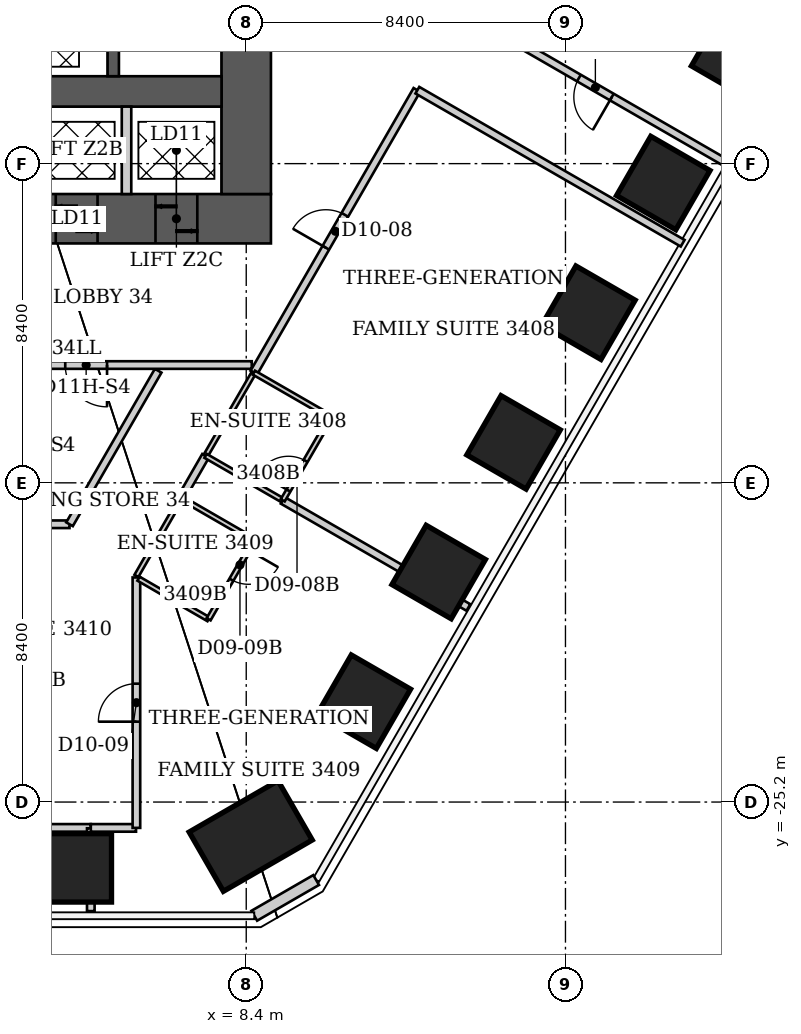
"""IFC4 building model, lengths in metres.
Left out: names, types, materials, properties, quantities, classifications, styles, units other than length and angle.
Written with IfcOpenShell. Run it as: python <this file> out.ifc"""

import sys

from ifc_helpers import new_model, si_unit, direction, frame, frame_2d, origin, origin_2d, place, context, subcontext, project, spatial, rectangle, extrude, element, fill, save


model = new_model("IFC4")
c1 = context("Model", 3, precision=1e-05, world=origin(), true_north=direction((0.0, 1.0)))
c2 = subcontext(c1, "Body", "Model", "MODEL_VIEW")
j1 = project(units=[si_unit("LENGTHUNIT", "METRE"), si_unit("PLANEANGLEUNIT", "RADIAN")], contexts=[c1])
p1 = place(None, origin())
s1 = spatial("IfcSite", under=j1, at=p1, CompositionType="ELEMENT")
p2 = place(p1, origin())
s2 = spatial("IfcBuilding", under=s1, at=p2, CompositionType="ELEMENT")
p3 = place(p2, frame((0.0, 0.0, 138.6)))
s3 = spatial("IfcBuildingStorey", under=s2, at=p3, CompositionType="ELEMENT", Elevation=138.6)
for number, where, z_axis, x_axis in (
    (1, (21.344, -5.499, 0.0), (0.0, 0.0, 1.0), (0.866, -0.5, 0.0)),
    (2, (19.374, -8.911, 0.0), (0.0, 0.0, 1.0), (0.866, -0.5, 0.0)),
    (3, (17.404, -12.323, 0.0), (0.0, 0.0, 1.0), (0.866, -0.5, 0.0)),
    (4, (15.434, -15.735, 0.0), (0.0, 0.0, 1.0), (0.866, -0.5, 0.0)),
    (5, (13.464, -19.147, 0.0), (0.0, 0.0, 1.0), (0.866, -0.5, 0.0)),
    (6, (11.494, -22.559, 0.0), (0.0, 0.0, 1.0), (0.866, -0.5, 0.0)),
):
    element("IfcColumn", number, at=place(p3, frame(where, z_axis=z_axis, x_axis=x_axis)), inside=s3, PredefinedType="COLUMN", context=c2, shape_type="SweptSolid", body=[
        extrude(rectangle(XDim=1.8, YDim=1.8, at=origin_2d()), origin(), (0.0, 0.0, 1.0), 3.8),
    ])
p4 = place(p3, frame((8.518, -26.094, 0.0), z_axis=(0.0, 0.0, 1.0), x_axis=(0.5, -0.866025403784, 0.0)))
e7 = element("IfcColumn", 7, at=p4, inside=s3, PredefinedType="COLUMN", context=c2, shape_type="SweptSolid", body=[
    extrude(rectangle(XDim=1.8, YDim=2.7, at=origin_2d()), origin(), (0.0, 0.0, 1.0), 3.8),
])
p5 = place(p3, frame((3.955, -26.932, 0.0), z_axis=(0.0, 0.0, 1.0), x_axis=(0.0, -1.0, 0.0)))
e8 = element("IfcColumn", 8, at=p5, inside=s3, PredefinedType="COLUMN", context=c2, shape_type="SweptSolid", body=[
    extrude(rectangle(XDim=1.8, YDim=1.8, at=origin_2d()), origin(), (0.0, 0.0, 1.0), 3.8),
])
p6 = place(p3, frame((-9.05, -9.85, 0.0), z_axis=(0.0, 0.0, 1.0), x_axis=(1.0, 0.0, 0.0)))
e9 = element("IfcWall", 9, at=p6, inside=s3, PredefinedType="SHEAR", context=c2, shape_type="SweptSolid", body=[
    extrude(rectangle(XDim=18.1, YDim=1.3, at=frame_2d((9.05, 0.0))), origin(), (0.0, 0.0, 1.0), 3.8),
])
p7 = place(p6, frame((1.938, 0.0, 0.0)))
e10 = element("IfcOpeningElement", 10, at=p7, cuts=e9, PredefinedType="OPENING", context=c2, shape_type="SweptSolid", body=[
    extrude(rectangle(XDim=1.1, YDim=2.2, at=frame_2d((0.55, 1.1))), frame((0.0, 0.65, 0.0), z_axis=(0.0, -1.0, 0.0), x_axis=(1.0, 0.0, 0.0)), (0.0, 0.0, 1.0), 1.3),
])
p8 = place(p6, frame((9.812, 0.0, 0.0)))
e11 = element("IfcOpeningElement", 11, at=p8, cuts=e9, PredefinedType="OPENING", context=c2, shape_type="SweptSolid", body=[
    extrude(rectangle(XDim=1.1, YDim=2.1, at=frame_2d((0.55, 1.05))), frame((0.0, 0.65, 0.0), z_axis=(0.0, -1.0, 0.0), x_axis=(1.0, 0.0, 0.0)), (0.0, 0.0, 1.0), 1.3),
])
p9 = place(p6, frame((12.438, 0.0, 0.0)))
e12 = element("IfcOpeningElement", 12, at=p9, cuts=e9, PredefinedType="OPENING", context=c2, shape_type="SweptSolid", body=[
    extrude(rectangle(XDim=1.1, YDim=2.1, at=frame_2d((0.55, 1.05))), frame((0.0, 0.65, 0.0), z_axis=(0.0, -1.0, 0.0), x_axis=(1.0, 0.0, 0.0)), (0.0, 0.0, 1.0), 1.3),
])
p10 = place(p6, frame((15.062, 0.0, 0.0)))
e13 = element("IfcOpeningElement", 13, at=p10, cuts=e9, PredefinedType="OPENING", context=c2, shape_type="SweptSolid", body=[
    extrude(rectangle(XDim=1.1, YDim=2.1, at=frame_2d((0.55, 1.05))), frame((0.0, 0.65, 0.0), z_axis=(0.0, -1.0, 0.0), x_axis=(1.0, 0.0, 0.0)), (0.0, 0.0, 1.0), 1.3),
])
p11 = place(p3, frame((8.4, -9.2, 0.0), z_axis=(0.0, 0.0, 1.0), x_axis=(0.0, 1.0, 0.0)))
e14 = element("IfcWall", 14, at=p11, inside=s3, PredefinedType="SHEAR", context=c2, shape_type="SweptSolid", body=[
    extrude(rectangle(XDim=15.3, YDim=1.3, at=frame_2d((7.65, 0.0))), origin(), (0.0, 0.0, 1.0), 3.8),
])
p12 = place(p11, frame((10.7, 0.0, 0.0)))
e15 = element("IfcOpeningElement", 15, at=p12, cuts=e14, PredefinedType="OPENING", context=c2, shape_type="SweptSolid", body=[
    extrude(rectangle(XDim=1.2, YDim=2.2, at=frame_2d((0.6, 1.1))), frame((0.0, 0.65, 0.0), z_axis=(0.0, -1.0, 0.0), x_axis=(1.0, 0.0, 0.0)), (0.0, 0.0, 1.0), 1.3),
])
p13 = place(p3, frame((-7.75, -6.5, 0.0), z_axis=(0.0, 0.0, 1.0), x_axis=(1.0, 0.0, 0.0)))
e16 = element("IfcWall", 16, at=p13, inside=s3, PredefinedType="SHEAR", context=c2, shape_type="SweptSolid", body=[
    extrude(rectangle(XDim=15.5, YDim=0.8, at=frame_2d((7.75, 0.0))), origin(), (0.0, 0.0, 1.0), 3.8),
])
p14 = place(p3, frame((4.9, -6.1, 0.0), z_axis=(0.0, 0.0, 1.0), x_axis=(0.0, 1.0, 0.0)))
e17 = element("IfcWall", 17, at=p14, inside=s3, PredefinedType="SHEAR", context=c2, shape_type="SweptSolid", body=[
    extrude(rectangle(XDim=7.2, YDim=0.3, at=frame_2d((3.6, 0.0))), origin(), (0.0, 0.0, 1.0), 3.8),
])
p15 = place(p3, frame((5.25, -9.2, 0.0), z_axis=(0.0, 0.0, 1.0), x_axis=(0.0, 1.0, 0.0)))
e18 = element("IfcWall", 18, at=p15, inside=s3, PredefinedType="PARTITIONING", context=c2, shape_type="SweptSolid", body=[
    extrude(rectangle(XDim=2.3, YDim=0.25, at=frame_2d((1.15, 0.0))), origin(), (0.0, 0.0, 1.0), 3.8),
])
p16 = place(p3, frame((10.24, -27.252, 0.0), z_axis=(0.0, 0.0, 1.0), x_axis=(-0.866045024864, -0.499966013754, 0.0)))
e19 = element("IfcWall", 19, at=p16, inside=s3, PredefinedType="SOLIDWALL", context=c2, shape_type="SweptSolid", body=[
    extrude(rectangle(XDim=1.88, YDim=0.3, at=frame_2d((0.94, 0.0))), origin(), (0.0, 0.0, 1.0), 3.64),
])
p17 = place(p3, frame((3.125, -25.88, 0.0), z_axis=(0.0, 0.0, 1.0), x_axis=(1.0, 0.0, 0.0)))
e20 = element("IfcWall", 20, at=p17, inside=s3, PredefinedType="PARTITIONING", context=c2, shape_type="SweptSolid", body=[
    extrude(rectangle(XDim=1.185, YDim=0.2, at=frame_2d((0.593, 0.0))), origin(), (0.0, 0.0, 1.0), 3.64),
])
p18 = place(p3, frame((3.75, -17.89, 0.0), z_axis=(0.0, 0.0, 1.0), x_axis=(-1.0, 0.0, 0.0)))
e21 = element("IfcWall", 21, at=p18, inside=s3, PredefinedType="PARTITIONING", context=c2, shape_type="SweptSolid", body=[
    extrude(rectangle(XDim=2.15, YDim=0.2, at=frame_2d((1.075, 0.0))), origin(), (0.0, 0.0, 1.0), 3.64),
])
p19 = place(p3, frame((4.31, -28.07, 0.0), z_axis=(0.0, 0.0, 1.0), x_axis=(0.0, 1.0, 0.0)))
e22 = element("IfcWall", 22, at=p19, inside=s3, PredefinedType="PARTITIONING", context=c2, shape_type="SweptSolid", body=[
    extrude(rectangle(XDim=2.18, YDim=0.2, at=frame_2d((1.09, 0.0))), origin(), (0.0, 0.0, 1.0), 3.64),
])
p20 = place(p3, frame((4.31, -25.88, 0.0), z_axis=(0.0, 0.0, 1.0), x_axis=(1.0, 0.0, 0.0)))
e23 = element("IfcWall", 23, at=p20, inside=s3, PredefinedType="PARTITIONING", context=c2, shape_type="SweptSolid", body=[
    extrude(rectangle(XDim=1.19, YDim=0.2, at=frame_2d((0.595, 0.0))), origin(), (0.0, 0.0, 1.0), 3.64),
])
p21 = place(p3, frame((5.51, -25.88, 0.0), z_axis=(0.0, 0.0, 1.0), x_axis=(0.0, 1.0, 0.0)))
e24 = element("IfcWall", 24, at=p21, inside=s3, PredefinedType="PARTITIONING", context=c2, shape_type="SweptSolid", body=[
    extrude(rectangle(XDim=6.59, YDim=0.2, at=frame_2d((3.295, 0.0))), origin(), (0.0, 0.0, 1.0), 3.64),
])
p22 = place(p21, frame((2.795, 0.0, 0.0)))
e25 = element("IfcOpeningElement", 25, at=p22, cuts=e24, PredefinedType="OPENING", context=c2, shape_type="SweptSolid", body=[
    extrude(rectangle(XDim=1.0, YDim=2.13, at=frame_2d((0.5, 1.065))), frame((0.0, 0.1, 0.0), z_axis=(0.0, -1.0, 0.0), x_axis=(1.0, 0.0, 0.0)), (0.0, 0.0, 1.0), 0.2),
])
p23 = place(p3, frame((5.51, -19.25, 0.0), z_axis=(0.0, 0.0, 1.0), x_axis=(0.498837591974, 0.866695481028, 0.0)))
e26 = element("IfcWall", 26, at=p23, inside=s3, PredefinedType="PARTITIONING", context=c2, shape_type="SweptSolid", body=[
    extrude(rectangle(XDim=2.365, YDim=0.12, at=frame_2d((1.183, 0.0))), origin(), (0.0, 0.0, 1.0), 3.64),
])
p24 = place(p3, frame((5.566, -19.323, 0.0), z_axis=(0.0, 0.0, 1.0), x_axis=(0.865436746432, -0.501018201192, 0.0)))
e27 = element("IfcWall", 27, at=p24, inside=s3, PredefinedType="PARTITIONING", context=c2, shape_type="SweptSolid", body=[
    extrude(rectangle(XDim=2.13, YDim=0.12, at=frame_2d((1.065, 0.0))), origin(), (0.0, 0.0, 1.0), 3.64),
])
p25 = place(p3, frame((6.083, -13.85, 0.0), z_axis=(0.0, 0.0, 1.0), x_axis=(-0.499977643516, -0.866038310922, 0.0)))
e28 = element("IfcWall", 28, at=p25, inside=s3, PredefinedType="PARTITIONING", context=c2, shape_type="SweptSolid", body=[
    extrude(rectangle(XDim=4.665, YDim=0.2, at=frame_2d((2.333, 0.0))), origin(), (0.0, 0.0, 1.0), 3.64),
])
p26 = place(p3, frame((6.69, -17.2, 0.0), z_axis=(0.0, 0.0, 1.0), x_axis=(0.499623473928, 0.866242682105, 0.0)))
e29 = element("IfcWall", 29, at=p26, inside=s3, PredefinedType="PARTITIONING", context=c2, shape_type="SweptSolid", body=[
    extrude(rectangle(XDim=1.281, YDim=0.2, at=frame_2d((0.641, 0.0))), origin(), (0.0, 0.0, 1.0), 3.64),
])
p27 = place(p3, frame((7.33, -16.09, 0.0), z_axis=(0.0, 0.0, 1.0), x_axis=(0.501632941931, 0.865080569409, 0.0)))
e30 = element("IfcWall", 30, at=p27, inside=s3, PredefinedType="PARTITIONING", context=c2, shape_type="SweptSolid", body=[
    extrude(rectangle(XDim=2.532, YDim=0.12, at=frame_2d((1.266, 0.0))), origin(), (0.0, 0.0, 1.0), 3.64),
])
p28 = place(p3, frame((7.33, -16.09, 0.0), z_axis=(0.0, 0.0, 1.0), x_axis=(0.866202934772, -0.499692381163, 0.0)))
e31 = element("IfcWall", 31, at=p28, inside=s3, PredefinedType="PARTITIONING", context=c2, shape_type="SweptSolid", body=[
    extrude(rectangle(XDim=2.343, YDim=0.12, at=frame_2d((1.171, 0.0))), origin(), (0.0, 0.0, 1.0), 3.64),
])
p29 = place(p3, frame((7.41, -20.39, 0.0), z_axis=(0.0, 0.0, 1.0), x_axis=(0.499737123639, 0.866177122335, 0.0)))
e32 = element("IfcWall", 32, at=p29, inside=s3, PredefinedType="PARTITIONING", context=c2, shape_type="SweptSolid", body=[
    extrude(rectangle(XDim=2.401, YDim=0.12, at=frame_2d((1.201, 0.0))), origin(), (0.0, 0.0, 1.0), 3.64),
])
p30 = place(p29, frame((1.201, 0.0, 0.0)))
e33 = element("IfcOpeningElement", 33, at=p30, cuts=e32, PredefinedType="OPENING", context=c2, shape_type="SweptSolid", body=[
    extrude(rectangle(XDim=0.9, YDim=2.03, at=frame_2d((0.45, 1.015))), frame((0.0, 0.06, 0.0), z_axis=(0.0, -1.0, 0.0), x_axis=(1.0, 0.0, 0.0)), (0.0, 0.0, 1.0), 0.12),
])
p31 = place(p3, frame((8.545, -13.7, 0.0), z_axis=(0.0, 0.0, 1.0), x_axis=(-1.0, 0.0, 0.0)))
e34 = element("IfcWall", 34, at=p31, inside=s3, PredefinedType="PARTITIONING", context=c2, shape_type="SweptSolid", body=[
    extrude(rectangle(XDim=8.715, YDim=0.2, at=frame_2d((4.357, 0.0))), origin(), (0.0, 0.0, 1.0), 3.64),
])
p32 = place(p31, frame((3.808, 0.0, 0.0)))
e35 = element("IfcOpeningElement", 35, at=p32, cuts=e34, PredefinedType="OPENING", context=c2, shape_type="SweptSolid", body=[
    extrude(rectangle(XDim=1.1, YDim=2.2, at=frame_2d((0.55, 1.1))), frame((0.0, 0.1, 0.0), z_axis=(0.0, -1.0, 0.0), x_axis=(1.0, 0.0, 0.0)), (0.0, 0.0, 1.0), 0.2),
])
p33 = place(p3, frame((8.6, -13.9, 0.0), z_axis=(0.0, 0.0, 1.0), x_axis=(0.499505868716, 0.866310502717, 0.0)))
e36 = element("IfcWall", 36, at=p33, inside=s3, PredefinedType="PARTITIONING", context=c2, shape_type="SweptSolid", body=[
    extrude(rectangle(XDim=8.588, YDim=0.2, at=frame_2d((4.294, 0.0))), origin(), (0.0, 0.0, 1.0), 3.64),
])
p34 = place(p33, frame((3.794, 0.0, 0.0)))
e37 = element("IfcOpeningElement", 37, at=p34, cuts=e36, PredefinedType="OPENING", context=c2, shape_type="SweptSolid", body=[
    extrude(rectangle(XDim=1.0, YDim=2.13, at=frame_2d((0.5, 1.065))), frame((0.0, 0.1, 0.0), z_axis=(0.0, -1.0, 0.0), x_axis=(1.0, 0.0, 0.0)), (0.0, 0.0, 1.0), 0.2),
])
p35 = place(p3, frame((8.61, -18.31, 0.0), z_axis=(0.0, 0.0, 1.0), x_axis=(-0.865732595383, 0.500506816428, 0.0)))
e38 = element("IfcWall", 38, at=p35, inside=s3, PredefinedType="PARTITIONING", context=c2, shape_type="SweptSolid", body=[
    extrude(rectangle(XDim=2.218, YDim=0.12, at=frame_2d((1.109, 0.0))), origin(), (0.0, 0.0, 1.0), 3.64),
])
p36 = place(p3, frame((9.359, -17.261, 0.0), z_axis=(0.0, 0.0, 1.0), x_axis=(0.866179822479, -0.499732443544, 0.0)))
e39 = element("IfcWall", 39, at=p36, inside=s3, PredefinedType="PARTITIONING", context=c2, shape_type="SweptSolid", body=[
    extrude(rectangle(XDim=5.642, YDim=0.2, at=frame_2d((2.821, 0.0))), origin(), (0.0, 0.0, 1.0), 3.64),
])
p37 = place(p3, frame((9.36, -17.26, 0.0), z_axis=(0.0, 0.0, 1.0), x_axis=(0.501602618681, 0.865098152196, 0.0)))
e40 = element("IfcWall", 40, at=p37, inside=s3, PredefinedType="PARTITIONING", context=c2, shape_type="SweptSolid", body=[
    extrude(rectangle(XDim=2.531, YDim=0.12, at=frame_2d((1.266, 0.0))), origin(), (0.0, 0.0, 1.0), 3.64),
])
p38 = place(p37, frame((0.3, 0.0, 0.0)))
e41 = element("IfcOpeningElement", 41, at=p38, cuts=e40, PredefinedType="OPENING", context=c2, shape_type="SweptSolid", body=[
    extrude(rectangle(XDim=0.9, YDim=2.03, at=frame_2d((0.45, 1.015))), frame((0.0, 0.06, 0.0), z_axis=(0.0, -1.0, 0.0), x_axis=(1.0, 0.0, 0.0)), (0.0, 0.0, 1.0), 0.12),
])
p39 = place(p3, frame((10.63, -15.07, 0.0), z_axis=(0.0, 0.0, 1.0), x_axis=(-0.866345142729, 0.499445786517, 0.0)))
e42 = element("IfcWall", 42, at=p39, inside=s3, PredefinedType="PARTITIONING", context=c2, shape_type="SweptSolid", body=[
    extrude(rectangle(XDim=2.343, YDim=0.12, at=frame_2d((1.171, 0.0))), origin(), (0.0, 0.0, 1.0), 3.64),
])
p40 = place(p3, frame((12.903, -6.468, 0.0), z_axis=(0.0, 0.0, 1.0), x_axis=(0.866179534239, -0.499732943147, 0.0)))
e43 = element("IfcWall", 43, at=p40, inside=s3, PredefinedType="PARTITIONING", context=c2, shape_type="SweptSolid", body=[
    extrude(rectangle(XDim=8.06, YDim=0.2, at=frame_2d((4.03, 0.0))), origin(), (0.0, 0.0, 1.0), 3.64),
])
p41 = place(p3, frame((21.084, -8.415, 0.0), z_axis=(0.0, 0.0, 1.0), x_axis=(-0.866174008169, 0.499742521277, 0.0)))
e44 = element("IfcWall", 44, at=p41, inside=s3, PredefinedType="PARTITIONING", context=c2, shape_type="SweptSolid", body=[
    extrude(rectangle(XDim=8.074, YDim=0.2, at=frame_2d((4.037, 0.0))), origin(), (0.0, 0.0, 1.0), 3.64),
])
p42 = place(p41, frame((3.537, 0.0, 0.0)))
e45 = element("IfcOpeningElement", 45, at=p42, cuts=e44, PredefinedType="OPENING", context=c2, shape_type="SweptSolid", body=[
    extrude(rectangle(XDim=1.0, YDim=2.13, at=frame_2d((0.5, 1.065))), frame((0.0, 0.1, 0.0), z_axis=(0.0, -1.0, 0.0), x_axis=(1.0, 0.0, 0.0)), (0.0, 0.0, 1.0), 0.2),
])
p43 = place(p42, origin())
e46 = element("IfcDoor", 46, at=p43, inside=s3, OperationType="SINGLE_SWING_LEFT", PredefinedType="DOOR", context=c2, shape_type="SweptSolid", body=[
    extrude(rectangle(XDim=1.0, YDim=2.13, at=frame_2d((0.5, 1.065))), frame((0.0, 0.025, 0.0), z_axis=(0.0, -1.0, 0.0), x_axis=(1.0, 0.0, 0.0)), (0.0, 0.0, 1.0), 0.05),
])
fill(e45, e46)
p44 = place(p34, origin())
e47 = element("IfcDoor", 47, at=p44, inside=s3, OperationType="SINGLE_SWING_LEFT", PredefinedType="DOOR", context=c2, shape_type="SweptSolid", body=[
    extrude(rectangle(XDim=1.0, YDim=2.13, at=frame_2d((0.5, 1.065))), frame((0.0, 0.025, 0.0), z_axis=(0.0, -1.0, 0.0), x_axis=(1.0, 0.0, 0.0)), (0.0, 0.0, 1.0), 0.05),
])
fill(e37, e47)
p45 = place(p38, origin())
e48 = element("IfcDoor", 48, at=p45, inside=s3, OperationType="SINGLE_SWING_LEFT", PredefinedType="DOOR", context=c2, shape_type="SweptSolid", body=[
    extrude(rectangle(XDim=0.9, YDim=2.03, at=frame_2d((0.45, 1.015))), frame((0.0, 0.025, 0.0), z_axis=(0.0, -1.0, 0.0), x_axis=(1.0, 0.0, 0.0)), (0.0, 0.0, 1.0), 0.05),
])
fill(e41, e48)
p46 = place(p22, origin())
e49 = element("IfcDoor", 49, at=p46, inside=s3, OperationType="SINGLE_SWING_LEFT", PredefinedType="DOOR", context=c2, shape_type="SweptSolid", body=[
    extrude(rectangle(XDim=1.0, YDim=2.13, at=frame_2d((0.5, 1.065))), frame((0.0, 0.025, 0.0), z_axis=(0.0, -1.0, 0.0), x_axis=(1.0, 0.0, 0.0)), (0.0, 0.0, 1.0), 0.05),
])
fill(e25, e49)
p47 = place(p30, origin())
e50 = element("IfcDoor", 50, at=p47, inside=s3, OperationType="SINGLE_SWING_RIGHT", PredefinedType="DOOR", context=c2, shape_type="SweptSolid", body=[
    extrude(rectangle(XDim=0.9, YDim=2.03, at=frame_2d((0.45, 1.015))), frame((0.0, 0.025, 0.0), z_axis=(0.0, -1.0, 0.0), x_axis=(1.0, 0.0, 0.0)), (0.0, 0.0, 1.0), 0.05),
])
fill(e33, e50)
p48 = place(p32, origin())
e51 = element("IfcDoor", 51, at=p48, inside=s3, OperationType="SINGLE_SWING_LEFT", PredefinedType="DOOR", context=c2, shape_type="SweptSolid", body=[
    extrude(rectangle(XDim=1.1, YDim=2.2, at=frame_2d((0.55, 1.1))), frame((0.0, 0.025, 0.0), z_axis=(0.0, -1.0, 0.0), x_axis=(1.0, 0.0, 0.0)), (0.0, 0.0, 1.0), 0.05),
])
fill(e35, e51)
p49 = place(p9, origin())
e52 = element("IfcDoor", 52, at=p49, inside=s3, OperationType="DOUBLE_DOOR_SLIDING", PredefinedType="DOOR", context=c2, shape_type="SweptSolid", body=[
    extrude(rectangle(XDim=1.1, YDim=2.1, at=frame_2d((0.55, 1.05))), frame((0.0, 0.025, 0.0), z_axis=(0.0, -1.0, 0.0), x_axis=(1.0, 0.0, 0.0)), (0.0, 0.0, 1.0), 0.05),
])
fill(e12, e52)
p50 = place(p10, origin())
e53 = element("IfcDoor", 53, at=p50, inside=s3, OperationType="DOUBLE_DOOR_SLIDING", PredefinedType="DOOR", context=c2, shape_type="SweptSolid", body=[
    extrude(rectangle(XDim=1.1, YDim=2.1, at=frame_2d((0.55, 1.05))), frame((0.0, 0.025, 0.0), z_axis=(0.0, -1.0, 0.0), x_axis=(1.0, 0.0, 0.0)), (0.0, 0.0, 1.0), 0.05),
])
fill(e13, e53)
save(model, sys.argv[1])
